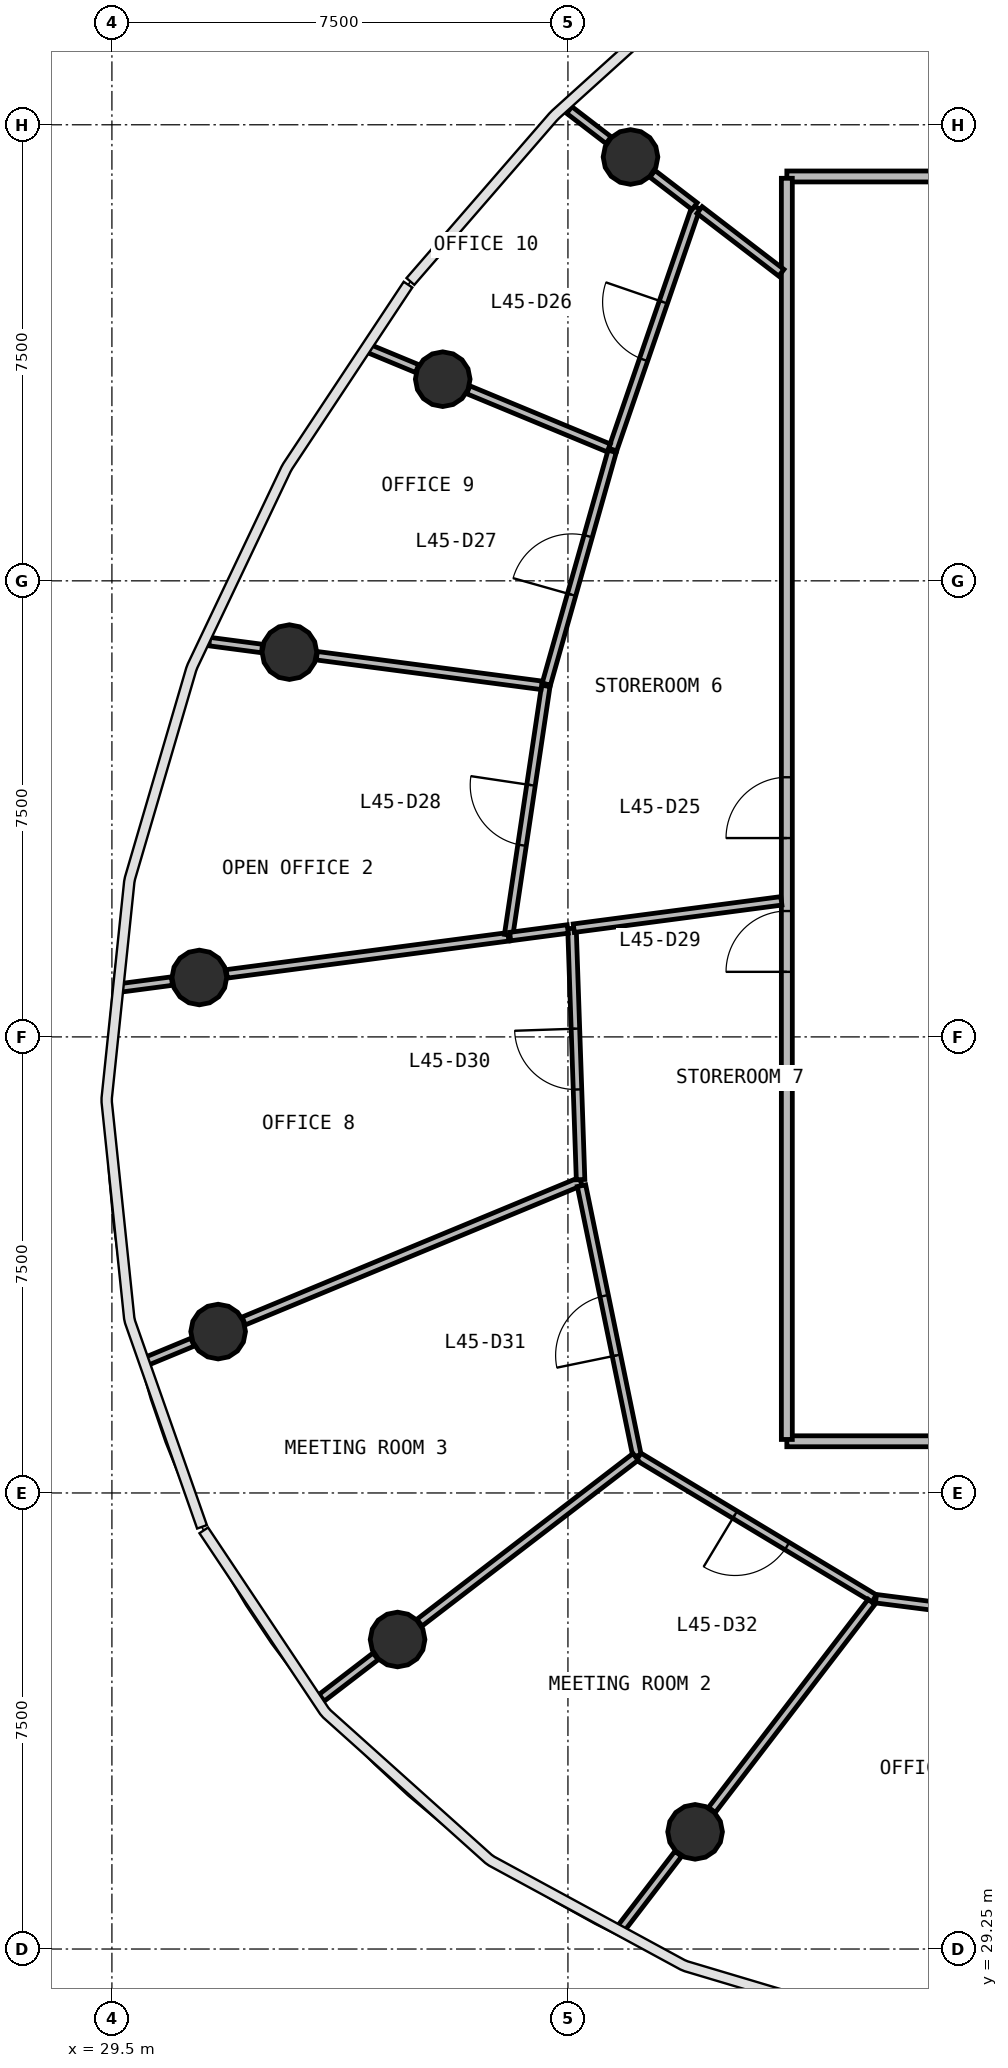
"""IFC4 building model, lengths in metres.
Left out: names, types, materials, properties, quantities, classifications, styles, units other than length and angle.
Written with IfcOpenShell. Run it as: python <this file> out.ifc"""

import sys

from ifc_helpers import new_model, si_unit, direction, frame, frame_2d, origin, origin_2d, place, context, subcontext, project, spatial, rectangle, circle, extrude, source, transform, mapped, element, fill, save


model = new_model("IFC4")
c1 = context("Model", 3, precision=1e-05, world=origin(), true_north=direction((0.0, 1.0)))
c2 = subcontext(c1, "Body", "Model", "MODEL_VIEW")
j1 = project(units=[si_unit("LENGTHUNIT", "METRE"), si_unit("PLANEANGLEUNIT", "RADIAN")], contexts=[c1])
p1 = place(None, origin())
s1 = spatial("IfcSite", under=j1, at=p1, CompositionType="ELEMENT")
p2 = place(p1, origin())
s2 = spatial("IfcBuilding", under=s1, at=p2, CompositionType="ELEMENT")
p3 = place(p2, frame((0.0, 0.0, 187.7)))
s3 = spatial("IfcBuildingStorey", under=s2, at=p3, CompositionType="ELEMENT", Elevation=187.7)
m1 = source(origin(), c2, "Body", "SweptSolid", [
    extrude(circle(Radius=0.45, at=origin_2d()), origin(), (0.0, 0.0, 1.0), 3.9),
])
for number, where, z_axis, x_axis in (
    (1, (38.029, 58.72, 0.0), (0.0, 0.0, 1.0), (1.0, 0.0, 0.0)),
    (2, (34.941, 55.066, 0.0), (0.0, 0.0, 1.0), (1.0, 0.0, 0.0)),
    (3, (32.419, 50.578, 0.0), (0.0, 0.0, 1.0), (1.0, 0.0, 0.0)),
    (4, (30.938, 45.227, 0.0), (0.0, 0.0, 1.0), (1.0, 0.0, 0.0)),
    (5, (31.247, 39.404, 0.0), (0.0, 0.0, 1.0), (1.0, 0.0, 0.0)),
    (6, (34.198, 34.34, 0.0), (0.0, 0.0, 1.0), (1.0, 0.0, 0.0)),
    (7, (39.091, 31.177, 0.0), (0.0, 0.0, 1.0), (1.0, 0.0, 0.0)),
):
    element("IfcColumn", number, at=place(p3, frame(where, z_axis=z_axis, x_axis=x_axis)), inside=s3, PredefinedType="COLUMN", context=c2, shape_type="MappedRepresentation", body=[
        mapped(m1, transform((0.0, 0.0, 0.0), scale=1.0)),
    ])
p4 = place(p3, frame((40.6, 58.4, 0.0), z_axis=(0.0, 0.0, 1.0), x_axis=(1.0, 0.0, 0.0)))
e8 = element("IfcWall", 8, at=p4, inside=s3, PredefinedType="PARTITIONING", context=c2, shape_type="SweptSolid", body=[
    extrude(rectangle(XDim=22.8, YDim=0.18, at=frame_2d((11.4, 0.0))), origin(), (0.0, 0.0, 1.0), 2.88),
])
p5 = place(p4, frame((16.05, 0.0, 0.0)))
e9 = element("IfcOpeningElement", 9, at=p5, cuts=e8, PredefinedType="OPENING", context=c2, shape_type="SweptSolid", body=[
    extrude(rectangle(XDim=0.9, YDim=2.1, at=frame_2d((0.45, 1.05))), frame((0.0, 0.1, 0.0), z_axis=(0.0, -1.0, 0.0), x_axis=(1.0, 0.0, 0.0)), (0.0, 0.0, 1.0), 0.2),
])
p6 = place(p4, frame((13.05, 0.0, 0.0)))
e10 = element("IfcOpeningElement", 10, at=p6, cuts=e8, PredefinedType="OPENING", context=c2, shape_type="SweptSolid", body=[
    extrude(rectangle(XDim=0.9, YDim=2.1, at=frame_2d((0.45, 1.05))), frame((0.0, 0.1, 0.0), z_axis=(0.0, -1.0, 0.0), x_axis=(1.0, 0.0, 0.0)), (0.0, 0.0, 1.0), 0.2),
])
p7 = place(p4, frame((10.95, 0.0, 0.0)))
e11 = element("IfcOpeningElement", 11, at=p7, cuts=e8, PredefinedType="OPENING", context=c2, shape_type="SweptSolid", body=[
    extrude(rectangle(XDim=1.0, YDim=2.1, at=frame_2d((0.5, 1.05))), frame((0.0, 0.1, 0.0), z_axis=(0.0, -1.0, 0.0), x_axis=(1.0, 0.0, 0.0)), (0.0, 0.0, 1.0), 0.2),
])
p8 = place(p3, frame((63.4, 37.6, 0.0), z_axis=(0.0, 0.0, 1.0), x_axis=(-1.0, 0.0, 0.0)))
e12 = element("IfcWall", 12, at=p8, inside=s3, PredefinedType="PARTITIONING", context=c2, shape_type="SweptSolid", body=[
    extrude(rectangle(XDim=22.8, YDim=0.18, at=frame_2d((11.4, 0.0))), origin(), (0.0, 0.0, 1.0), 2.88),
])
p9 = place(p8, frame((10.95, 0.0, 0.0)))
e13 = element("IfcOpeningElement", 13, at=p9, cuts=e12, PredefinedType="OPENING", context=c2, shape_type="SweptSolid", body=[
    extrude(rectangle(XDim=1.0, YDim=2.1, at=frame_2d((0.5, 1.05))), frame((0.0, 0.1, 0.0), z_axis=(0.0, -1.0, 0.0), x_axis=(1.0, 0.0, 0.0)), (0.0, 0.0, 1.0), 0.2),
])
p10 = place(p8, frame((8.75, 0.0, 0.0)))
e14 = element("IfcOpeningElement", 14, at=p10, cuts=e12, PredefinedType="OPENING", context=c2, shape_type="SweptSolid", body=[
    extrude(rectangle(XDim=1.0, YDim=2.1, at=frame_2d((0.5, 1.05))), frame((0.0, 0.1, 0.0), z_axis=(0.0, -1.0, 0.0), x_axis=(1.0, 0.0, 0.0)), (0.0, 0.0, 1.0), 0.2),
])
p11 = place(p8, frame((1.95, 0.0, 0.0)))
e15 = element("IfcOpeningElement", 15, at=p11, cuts=e12, PredefinedType="OPENING", context=c2, shape_type="SweptSolid", body=[
    extrude(rectangle(XDim=1.0, YDim=2.1, at=frame_2d((0.5, 1.05))), frame((0.0, 0.1, 0.0), z_axis=(0.0, -1.0, 0.0), x_axis=(1.0, 0.0, 0.0)), (0.0, 0.0, 1.0), 0.2),
])
p12 = place(p3, frame((40.6, 37.63, 0.0), z_axis=(0.0, 0.0, 1.0), x_axis=(0.0, 1.0, 0.0)))
e16 = element("IfcWall", 16, at=p12, inside=s3, PredefinedType="PARTITIONING", context=c2, shape_type="SweptSolid", body=[
    extrude(rectangle(XDim=20.74, YDim=0.18, at=frame_2d((10.37, 0.0))), origin(), (0.0, 0.0, 1.0), 2.88),
])
p13 = place(p12, frame((9.89, 0.0, 0.0)))
e17 = element("IfcOpeningElement", 17, at=p13, cuts=e16, PredefinedType="OPENING", context=c2, shape_type="SweptSolid", body=[
    extrude(rectangle(XDim=1.0, YDim=2.1, at=frame_2d((0.5, 1.05))), frame((0.0, 0.1, 0.0), z_axis=(0.0, -1.0, 0.0), x_axis=(1.0, 0.0, 0.0)), (0.0, 0.0, 1.0), 0.2),
])
p14 = place(p12, frame((7.69, 0.0, 0.0)))
e18 = element("IfcOpeningElement", 18, at=p14, cuts=e16, PredefinedType="OPENING", context=c2, shape_type="SweptSolid", body=[
    extrude(rectangle(XDim=1.0, YDim=2.1, at=frame_2d((0.5, 1.05))), frame((0.0, 0.1, 0.0), z_axis=(0.0, -1.0, 0.0), x_axis=(1.0, 0.0, 0.0)), (0.0, 0.0, 1.0), 0.2),
])
p15 = place(p3, frame((37.209, 41.873, 0.0), z_axis=(0.0, 0.0, 1.0), x_axis=(-0.923876934089, -0.38268970545, 0.0)))
e19 = element("IfcWall", 19, at=p15, inside=s3, PredefinedType="PARTITIONING", context=c2, shape_type="SweptSolid", body=[
    extrude(rectangle(XDim=5.998, YDim=0.14, at=frame_2d((2.999, 0.0))), origin(), (0.0, 0.0, 1.0), 2.88),
])
p16 = place(p3, frame((36.021, 45.896, 0.0), z_axis=(0.0, 0.0, 1.0), x_axis=(-0.991444688869, -0.130527502519, 0.0)))
e20 = element("IfcWall", 20, at=p16, inside=s3, PredefinedType="PARTITIONING", context=c2, shape_type="SweptSolid", body=[
    extrude(rectangle(XDim=4.672, YDim=0.14, at=frame_2d((2.336, 0.0))), origin(), (0.0, 0.0, 1.0), 2.88),
])
p17 = place(p3, frame((38.136, 37.362, 0.0), z_axis=(0.0, 0.0, 1.0), x_axis=(-0.201373374917, 0.979514555213, 0.0)))
e21 = element("IfcWall", 21, at=p17, inside=s3, PredefinedType="PARTITIONING", context=c2, shape_type="SweptSolid", body=[
    extrude(rectangle(XDim=4.534, YDim=0.14, at=frame_2d((2.267, 0.0))), origin(), (0.0, 0.0, 1.0), 2.88),
])
p18 = place(p17, frame((1.684, 0.0, 0.0)))
e22 = element("IfcOpeningElement", 22, at=p18, cuts=e21, PredefinedType="OPENING", context=c2, shape_type="SweptSolid", body=[
    extrude(rectangle(XDim=1.0, YDim=2.1, at=frame_2d((0.5, 1.05))), frame((0.0, 0.08, 0.0), z_axis=(0.0, -1.0, 0.0), x_axis=(1.0, 0.0, 0.0)), (0.0, 0.0, 1.0), 0.16),
])
p19 = place(p3, frame((42.036, 35.015, 0.0), z_axis=(0.0, 0.0, 1.0), x_axis=(-0.856772700272, 0.515694231176, 0.0)))
e23 = element("IfcWall", 23, at=p19, inside=s3, PredefinedType="PARTITIONING", context=c2, shape_type="SweptSolid", body=[
    extrude(rectangle(XDim=4.522, YDim=0.14, at=frame_2d((2.261, 0.0))), origin(), (0.0, 0.0, 1.0), 2.88),
])
p20 = place(p19, frame((1.672, 0.0, 0.0)))
e24 = element("IfcOpeningElement", 24, at=p20, cuts=e23, PredefinedType="OPENING", context=c2, shape_type="SweptSolid", body=[
    extrude(rectangle(XDim=1.0, YDim=2.1, at=frame_2d((0.5, 1.05))), frame((0.0, 0.08, 0.0), z_axis=(0.0, -1.0, 0.0), x_axis=(1.0, 0.0, 0.0)), (0.0, 0.0, 1.0), 0.16),
])
p21 = place(p3, frame((38.113, 37.344, 0.0), z_axis=(0.0, 0.0, 1.0), x_axis=(-0.793352786595, -0.608762150599, 0.0)))
e25 = element("IfcWall", 25, at=p21, inside=s3, PredefinedType="PARTITIONING", context=c2, shape_type="SweptSolid", body=[
    extrude(rectangle(XDim=4.48, YDim=0.14, at=frame_2d((2.24, 0.0))), origin(), (0.0, 0.0, 1.0), 2.88),
])
p22 = place(p3, frame((46.39, 34.458, 0.0), z_axis=(0.0, 0.0, 1.0), x_axis=(-0.991909170029, 0.126949590044, 0.0)))
e26 = element("IfcWall", 26, at=p22, inside=s3, PredefinedType="PARTITIONING", context=c2, shape_type="SweptSolid", body=[
    extrude(rectangle(XDim=4.36, YDim=0.14, at=frame_2d((2.18, 0.0))), origin(), (0.0, 0.0, 1.0), 2.88),
])
p23 = place(p22, frame((1.71, 0.0, 0.0)))
e27 = element("IfcOpeningElement", 27, at=p23, cuts=e26, PredefinedType="OPENING", context=c2, shape_type="SweptSolid", body=[
    extrude(rectangle(XDim=1.0, YDim=2.1, at=frame_2d((0.5, 1.05))), frame((0.0, 0.08, 0.0), z_axis=(0.0, -1.0, 0.0), x_axis=(1.0, 0.0, 0.0)), (0.0, 0.0, 1.0), 0.16),
])
p24 = place(p3, frame((41.993, 34.959, 0.0), z_axis=(0.0, 0.0, 1.0), x_axis=(-0.608785643194, -0.793334759506, 0.0)))
e28 = element("IfcWall", 28, at=p24, inside=s3, PredefinedType="PARTITIONING", context=c2, shape_type="SweptSolid", body=[
    extrude(rectangle(XDim=4.313, YDim=0.14, at=frame_2d((2.156, 0.0))), origin(), (0.0, 0.0, 1.0), 2.88),
])
p25 = place(p3, frame((37.736, 53.909, 0.0), z_axis=(0.0, 0.0, 1.0), x_axis=(0.325372826871, 0.945585809715, 0.0)))
e29 = element("IfcWall", 29, at=p25, inside=s3, PredefinedType="PARTITIONING", context=c2, shape_type="SweptSolid", body=[
    extrude(rectangle(XDim=4.214, YDim=0.14, at=frame_2d((2.107, 0.0))), origin(), (0.0, 0.0, 1.0), 2.88),
])
p26 = place(p25, frame((1.564, 0.0, 0.0)))
e30 = element("IfcOpeningElement", 30, at=p26, cuts=e29, PredefinedType="OPENING", context=c2, shape_type="SweptSolid", body=[
    extrude(rectangle(XDim=1.0, YDim=2.1, at=frame_2d((0.5, 1.05))), frame((0.0, 0.08, 0.0), z_axis=(0.0, -1.0, 0.0), x_axis=(1.0, 0.0, 0.0)), (0.0, 0.0, 1.0), 0.16),
])
p27 = place(p3, frame((36.025, 45.926, 0.0), z_axis=(0.0, 0.0, 1.0), x_axis=(0.147524764939, 0.989058362145, 0.0)))
e31 = element("IfcWall", 31, at=p27, inside=s3, PredefinedType="PARTITIONING", context=c2, shape_type="SweptSolid", body=[
    extrude(rectangle(XDim=4.142, YDim=0.14, at=frame_2d((2.071, 0.0))), origin(), (0.0, 0.0, 1.0), 2.88),
])
p28 = place(p27, frame((1.492, 0.0, 0.0)))
e32 = element("IfcOpeningElement", 32, at=p28, cuts=e31, PredefinedType="OPENING", context=c2, shape_type="SweptSolid", body=[
    extrude(rectangle(XDim=1.0, YDim=2.1, at=frame_2d((0.5, 1.05))), frame((0.0, 0.08, 0.0), z_axis=(0.0, -1.0, 0.0), x_axis=(1.0, 0.0, 0.0)), (0.0, 0.0, 1.0), 0.16),
])
p29 = place(p3, frame((37.208, 41.903, 0.0), z_axis=(0.0, 0.0, 1.0), x_axis=(-0.034201859053, 0.999414945274, 0.0)))
e33 = element("IfcWall", 33, at=p29, inside=s3, PredefinedType="PARTITIONING", context=c2, shape_type="SweptSolid", body=[
    extrude(rectangle(XDim=4.133, YDim=0.14, at=frame_2d((2.066, 0.0))), origin(), (0.0, 0.0, 1.0), 2.88),
])
p30 = place(p29, frame((1.483, 0.0, 0.0)))
e34 = element("IfcOpeningElement", 34, at=p30, cuts=e33, PredefinedType="OPENING", context=c2, shape_type="SweptSolid", body=[
    extrude(rectangle(XDim=1.0, YDim=2.1, at=frame_2d((0.5, 1.05))), frame((0.0, 0.08, 0.0), z_axis=(0.0, -1.0, 0.0), x_axis=(1.0, 0.0, 0.0)), (0.0, 0.0, 1.0), 0.16),
])
p31 = place(p3, frame((36.644, 50.052, 0.0), z_axis=(0.0, 0.0, 1.0), x_axis=(0.27222384034, 0.962233953231, 0.0)))
e35 = element("IfcWall", 35, at=p31, inside=s3, PredefinedType="PARTITIONING", context=c2, shape_type="SweptSolid", body=[
    extrude(rectangle(XDim=3.978, YDim=0.14, at=frame_2d((1.989, 0.0))), origin(), (0.0, 0.0, 1.0), 2.88),
])
p32 = place(p31, frame((1.529, 0.0, 0.0)))
e36 = element("IfcOpeningElement", 36, at=p32, cuts=e35, PredefinedType="OPENING", context=c2, shape_type="SweptSolid", body=[
    extrude(rectangle(XDim=1.0, YDim=2.1, at=frame_2d((0.5, 1.05))), frame((0.0, 0.08, 0.0), z_axis=(0.0, -1.0, 0.0), x_axis=(1.0, 0.0, 0.0)), (0.0, 0.0, 1.0), 0.16),
])
p33 = place(p3, frame((36.567, 50.032, 0.0), z_axis=(0.0, 0.0, 1.0), x_axis=(-0.991441588662, 0.130551048524, 0.0)))
e37 = element("IfcWall", 37, at=p33, inside=s3, PredefinedType="PARTITIONING", context=c2, shape_type="SweptSolid", body=[
    extrude(rectangle(XDim=3.729, YDim=0.14, at=frame_2d((1.865, 0.0))), origin(), (0.0, 0.0, 1.0), 2.88),
])
p34 = place(p3, frame((40.51, 46.487, 0.0), z_axis=(0.0, 0.0, 1.0), x_axis=(-0.991443915104, -0.130533379654, 0.0)))
e38 = element("IfcWall", 38, at=p34, inside=s3, PredefinedType="PARTITIONING", context=c2, shape_type="SweptSolid", body=[
    extrude(rectangle(XDim=3.443, YDim=0.14, at=frame_2d((1.722, 0.0))), origin(), (0.0, 0.0, 1.0), 2.88),
])
p35 = place(p3, frame((37.671, 53.935, 0.0), z_axis=(0.0, 0.0, 1.0), x_axis=(-0.923860896698, 0.382728420101, 0.0)))
e39 = element("IfcWall", 39, at=p35, inside=s3, PredefinedType="PARTITIONING", context=c2, shape_type="SweptSolid", body=[
    extrude(rectangle(XDim=2.5, YDim=0.14, at=frame_2d((1.25, 0.0))), origin(), (0.0, 0.0, 1.0), 2.88),
])
p36 = place(p3, frame((40.51, 56.817, 0.0), z_axis=(0.0, 0.0, 1.0), x_axis=(-0.793383743535, 0.608721804681, 0.0)))
e40 = element("IfcWall", 40, at=p36, inside=s3, PredefinedType="PARTITIONING", context=c2, shape_type="SweptSolid", body=[
    extrude(rectangle(XDim=1.695, YDim=0.14, at=frame_2d((0.847, 0.0))), origin(), (0.0, 0.0, 1.0), 2.88),
])
p37 = place(p3, frame((38.814, 30.816, 0.0), z_axis=(0.0, 0.0, 1.0), x_axis=(-0.608679829307, -0.793415947278, 0.0)))
e41 = element("IfcWall", 41, at=p37, inside=s3, PredefinedType="PARTITIONING", context=c2, shape_type="SweptSolid", body=[
    extrude(rectangle(XDim=1.569, YDim=0.14, at=frame_2d((0.784, 0.0))), origin(), (0.0, 0.0, 1.0), 2.88),
])
p38 = place(p3, frame((33.837, 34.063, 0.0), z_axis=(0.0, 0.0, 1.0), x_axis=(-0.793385234627, -0.608719861247, 0.0)))
e42 = element("IfcWall", 42, at=p38, inside=s3, PredefinedType="PARTITIONING", context=c2, shape_type="SweptSolid", body=[
    extrude(rectangle(XDim=1.12, YDim=0.14, at=frame_2d((0.56, 0.0))), origin(), (0.0, 0.0, 1.0), 2.88),
])
p39 = place(p3, frame((36.997, 46.025, 0.0), z_axis=(0.0, 0.0, 1.0), x_axis=(-0.991425548732, -0.130672802528, 0.0)))
e43 = element("IfcWall", 43, at=p39, inside=s3, PredefinedType="PARTITIONING", context=c2, shape_type="SweptSolid", body=[
    extrude(rectangle(XDim=0.955, YDim=0.14, at=frame_2d((0.478, 0.0))), origin(), (0.0, 0.0, 1.0), 2.88),
])
p40 = place(p3, frame((39.083, 57.912, 0.0), z_axis=(0.0, 0.0, 1.0), x_axis=(-0.793381490019, 0.608724741814, 0.0)))
e44 = element("IfcWall", 44, at=p40, inside=s3, PredefinedType="PARTITIONING", context=c2, shape_type="SweptSolid", body=[
    extrude(rectangle(XDim=0.874, YDim=0.14, at=frame_2d((0.437, 0.0))), origin(), (0.0, 0.0, 1.0), 2.88),
])
p41 = place(p3, frame((31.969, 50.637, 0.0), z_axis=(0.0, 0.0, 1.0), x_axis=(-0.991462846373, 0.130389509788, 0.0)))
e45 = element("IfcWall", 45, at=p41, inside=s3, PredefinedType="PARTITIONING", context=c2, shape_type="SweptSolid", body=[
    extrude(rectangle(XDim=0.875, YDim=0.14, at=frame_2d((0.437, 0.0))), origin(), (0.0, 0.0, 1.0), 2.88),
])
p42 = place(p3, frame((30.487, 45.168, 0.0), z_axis=(0.0, 0.0, 1.0), x_axis=(-0.991452381322, -0.130469059822, 0.0)))
e46 = element("IfcWall", 46, at=p42, inside=s3, PredefinedType="PARTITIONING", context=c2, shape_type="SweptSolid", body=[
    extrude(rectangle(XDim=0.868, YDim=0.14, at=frame_2d((0.434, 0.0))), origin(), (0.0, 0.0, 1.0), 2.88),
])
p43 = place(p3, frame((34.52, 55.24, 0.0), z_axis=(0.0, 0.0, 1.0), x_axis=(-0.923967777062, 0.38247032166, 0.0)))
e47 = element("IfcWall", 47, at=p43, inside=s3, PredefinedType="PARTITIONING", context=c2, shape_type="SweptSolid", body=[
    extrude(rectangle(XDim=0.849, YDim=0.14, at=frame_2d((0.424, 0.0))), origin(), (0.0, 0.0, 1.0), 2.88),
])
p44 = place(p3, frame((30.826, 39.23, 0.0), z_axis=(0.0, 0.0, 1.0), x_axis=(-0.923831922477, -0.382798352939, 0.0)))
e48 = element("IfcWall", 48, at=p44, inside=s3, PredefinedType="PARTITIONING", context=c2, shape_type="SweptSolid", body=[
    extrude(rectangle(XDim=0.821, YDim=0.14, at=frame_2d((0.41, 0.0))), origin(), (0.0, 0.0, 1.0), 2.88),
])
p45 = place(p3, frame((37.668, 58.997, 0.0), z_axis=(0.0, 0.0, 1.0), x_axis=(-0.793336246331, 0.608783705644, 0.0)))
e49 = element("IfcWall", 49, at=p45, inside=s3, PredefinedType="PARTITIONING", context=c2, shape_type="SweptSolid", body=[
    extrude(rectangle(XDim=0.815, YDim=0.14, at=frame_2d((0.407, 0.0))), origin(), (0.0, 0.0, 1.0), 2.88),
])
m2 = source(origin(), c2, "Body", "SweptSolid", [
    extrude(rectangle(XDim=1.0, YDim=2.1, at=frame_2d((0.5, 1.05))), frame((0.0, 0.025, 0.0), z_axis=(0.0, -1.0, 0.0), x_axis=(1.0, 0.0, 0.0)), (0.0, 0.0, 1.0), 0.05),
])
p46 = place(p13, origin())
e50 = element("IfcDoor", 50, at=p46, inside=s3, OperationType="SINGLE_SWING_LEFT", PredefinedType="DOOR", context=c2, shape_type="MappedRepresentation", body=[
    mapped(m2, transform((0.0, 0.0, 0.0), scale=1.0)),
])
fill(e17, e50)
p47 = place(p26, origin())
e51 = element("IfcDoor", 51, at=p47, inside=s3, OperationType="SINGLE_SWING_RIGHT", PredefinedType="DOOR", context=c2, shape_type="MappedRepresentation", body=[
    mapped(m2, transform((0.0, 0.0, 0.0), scale=1.0)),
])
fill(e30, e51)
p48 = place(p32, origin())
e52 = element("IfcDoor", 52, at=p48, inside=s3, OperationType="SINGLE_SWING_LEFT", PredefinedType="DOOR", context=c2, shape_type="MappedRepresentation", body=[
    mapped(m2, transform((0.0, 0.0, 0.0), scale=1.0)),
])
fill(e36, e52)
p49 = place(p28, origin())
e53 = element("IfcDoor", 53, at=p49, inside=s3, OperationType="SINGLE_SWING_RIGHT", PredefinedType="DOOR", context=c2, shape_type="MappedRepresentation", body=[
    mapped(m2, transform((0.0, 0.0, 0.0), scale=1.0)),
])
fill(e32, e53)
p50 = place(p14, origin())
e54 = element("IfcDoor", 54, at=p50, inside=s3, OperationType="SINGLE_SWING_LEFT", PredefinedType="DOOR", context=c2, shape_type="MappedRepresentation", body=[
    mapped(m2, transform((0.0, 0.0, 0.0), scale=1.0)),
])
fill(e18, e54)
p51 = place(p30, origin())
e55 = element("IfcDoor", 55, at=p51, inside=s3, OperationType="SINGLE_SWING_RIGHT", PredefinedType="DOOR", context=c2, shape_type="MappedRepresentation", body=[
    mapped(m2, transform((0.0, 0.0, 0.0), scale=1.0)),
])
fill(e34, e55)
p52 = place(p18, origin())
e56 = element("IfcDoor", 56, at=p52, inside=s3, OperationType="SINGLE_SWING_LEFT", PredefinedType="DOOR", context=c2, shape_type="MappedRepresentation", body=[
    mapped(m2, transform((0.0, 0.0, 0.0), scale=1.0)),
])
fill(e22, e56)
p53 = place(p20, origin())
e57 = element("IfcDoor", 57, at=p53, inside=s3, OperationType="SINGLE_SWING_RIGHT", PredefinedType="DOOR", context=c2, shape_type="MappedRepresentation", body=[
    mapped(m2, transform((0.0, 0.0, 0.0), scale=1.0)),
])
fill(e24, e57)
save(model, sys.argv[1])
